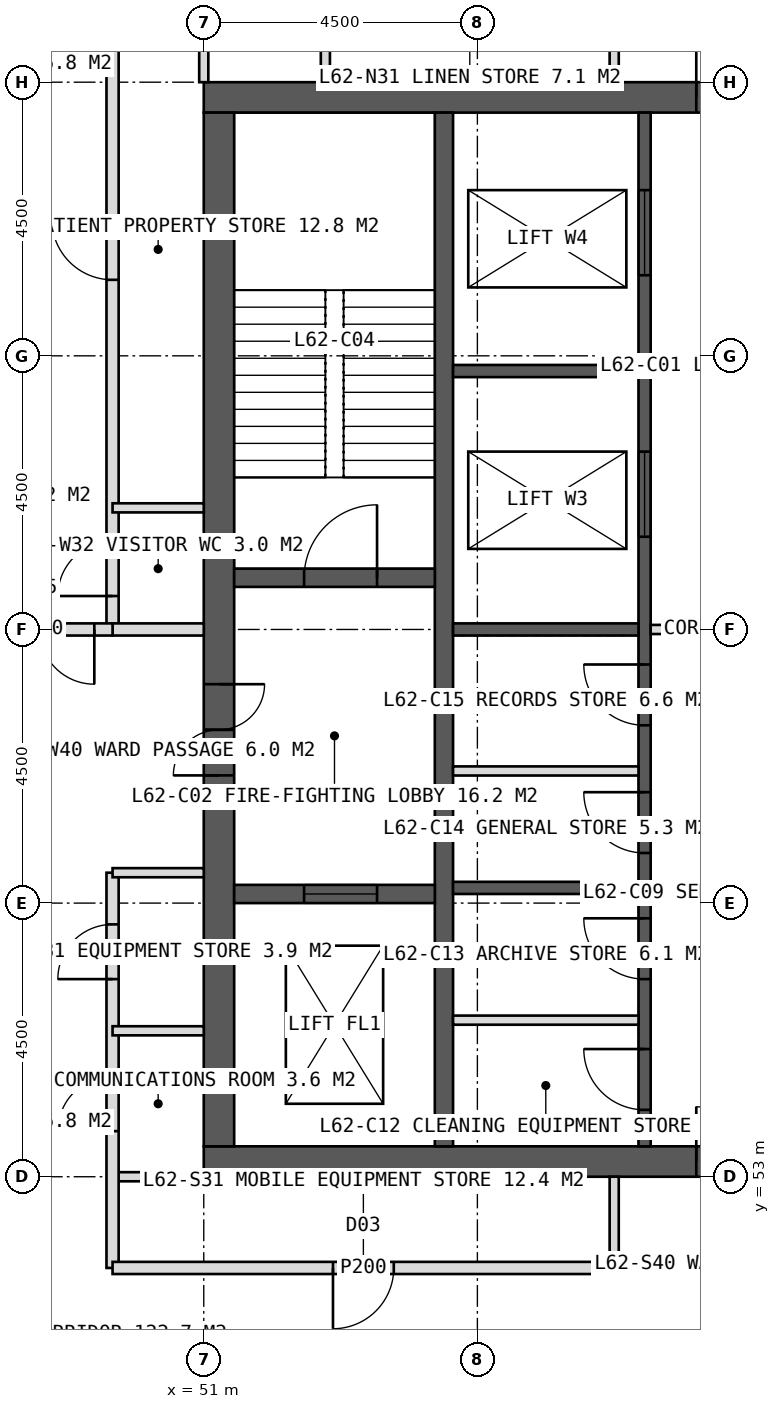
"""IFC4 building model, lengths in metres.
Left out: names, types, materials, properties, quantities, classifications, styles, units other than length and angle.
Written with IfcOpenShell. Run it as: python <this file> out.ifc"""

import sys

from ifc_helpers import new_model, si_unit, direction, frame, frame_2d, origin, place, context, subcontext, project, spatial, rectangle, extrude, element, fill, save


model = new_model("IFC4")
c1 = context("Model", 3, precision=1e-05, world=origin(), true_north=direction((0.0, 1.0)))
c2 = subcontext(c1, "Body", "Model", "MODEL_VIEW")
j1 = project(units=[si_unit("LENGTHUNIT", "METRE"), si_unit("PLANEANGLEUNIT", "RADIAN")], contexts=[c1])
p1 = place(None, origin())
s1 = spatial("IfcSite", under=j1, at=p1, CompositionType="ELEMENT")
p2 = place(p1, origin())
s2 = spatial("IfcBuilding", under=s1, at=p2, CompositionType="ELEMENT")
p3 = place(p2, frame((0.0, 0.0, 258.0)))
s3 = spatial("IfcBuildingStorey", under=s2, at=p3, CompositionType="ELEMENT", Elevation=258.0)
p4 = place(p3, frame((51.0, 70.75, 0.0), z_axis=(0.0, 0.0, 1.0), x_axis=(1.0, 0.0, 0.0)))
e1 = element("IfcWall", 1, at=p4, inside=s3, PredefinedType="SHEAR", context=c2, shape_type="SweptSolid", body=[
    extrude(rectangle(XDim=18.0, YDim=0.5, at=frame_2d((9.0, 0.0))), origin(), (0.0, 0.0, 1.0), 4.0),
])
p5 = place(p4, frame((8.1, 0.0, 0.0)))
e2 = element("IfcOpeningElement", 2, at=p5, cuts=e1, PredefinedType="OPENING", context=c2, shape_type="SweptSolid", body=[
    extrude(rectangle(XDim=1.8, YDim=2.2, at=frame_2d((0.9, 1.1))), frame((0.0, 0.26, 0.0), z_axis=(0.0, -1.0, 0.0), x_axis=(1.0, 0.0, 0.0)), (0.0, 0.0, 1.0), 0.52),
])
p6 = place(p3, frame((51.0, 53.25, 0.0), z_axis=(0.0, 0.0, 1.0), x_axis=(1.0, 0.0, 0.0)))
e3 = element("IfcWall", 3, at=p6, inside=s3, PredefinedType="SHEAR", context=c2, shape_type="SweptSolid", body=[
    extrude(rectangle(XDim=18.0, YDim=0.5, at=frame_2d((9.0, 0.0))), origin(), (0.0, 0.0, 1.0), 4.0),
])
p7 = place(p6, frame((8.1, 0.0, 0.0)))
e4 = element("IfcOpeningElement", 4, at=p7, cuts=e3, PredefinedType="OPENING", context=c2, shape_type="SweptSolid", body=[
    extrude(rectangle(XDim=1.8, YDim=2.2, at=frame_2d((0.9, 1.1))), frame((0.0, 0.26, 0.0), z_axis=(0.0, -1.0, 0.0), x_axis=(1.0, 0.0, 0.0)), (0.0, 0.0, 1.0), 0.52),
])
p8 = place(p3, frame((51.25, 53.5, 0.0), z_axis=(0.0, 0.0, 1.0), x_axis=(0.0, 1.0, 0.0)))
e5 = element("IfcWall", 5, at=p8, inside=s3, PredefinedType="SHEAR", context=c2, shape_type="SweptSolid", body=[
    extrude(rectangle(XDim=17.0, YDim=0.5, at=frame_2d((8.5, 0.0))), origin(), (0.0, 0.0, 1.0), 4.0),
])
p9 = place(p8, frame((6.1, 0.0, 0.0)))
e6 = element("IfcOpeningElement", 6, at=p9, cuts=e5, PredefinedType="OPENING", context=c2, shape_type="SweptSolid", body=[
    extrude(rectangle(XDim=1.5, YDim=2.2, at=frame_2d((0.75, 1.1))), frame((0.0, 0.26, 0.0), z_axis=(0.0, -1.0, 0.0), x_axis=(1.0, 0.0, 0.0)), (0.0, 0.0, 1.0), 0.52),
])
p10 = place(p3, frame((54.95, 53.5, 0.0), z_axis=(0.0, 0.0, 1.0), x_axis=(0.0, 1.0, 0.0)))
e7 = element("IfcWall", 7, at=p10, inside=s3, PredefinedType="SHEAR", context=c2, shape_type="SweptSolid", body=[
    extrude(rectangle(XDim=17.0, YDim=0.3, at=frame_2d((8.5, 0.0))), origin(), (0.0, 0.0, 1.0), 4.0),
])
p11 = place(p3, frame((58.25, 53.5, 0.0), z_axis=(0.0, 0.0, 1.0), x_axis=(0.0, 1.0, 0.0)))
e8 = element("IfcWall", 8, at=p11, inside=s3, PredefinedType="SHEAR", context=c2, shape_type="SweptSolid", body=[
    extrude(rectangle(XDim=17.0, YDim=0.2, at=frame_2d((8.5, 0.0))), origin(), (0.0, 0.0, 1.0), 4.0),
])
p12 = place(p11, frame((0.6, 0.0, 0.0)))
e9 = element("IfcOpeningElement", 9, at=p12, cuts=e8, PredefinedType="OPENING", context=c2, shape_type="SweptSolid", body=[
    extrude(rectangle(XDim=1.0, YDim=2.1, at=frame_2d((0.5, 1.05))), frame((0.0, 0.11, 0.0), z_axis=(0.0, -1.0, 0.0), x_axis=(1.0, 0.0, 0.0)), (0.0, 0.0, 1.0), 0.22),
])
p13 = place(p11, frame((2.75, 0.0, 0.0)))
e10 = element("IfcOpeningElement", 10, at=p13, cuts=e8, PredefinedType="OPENING", context=c2, shape_type="SweptSolid", body=[
    extrude(rectangle(XDim=1.0, YDim=2.1, at=frame_2d((0.5, 1.05))), frame((0.0, 0.11, 0.0), z_axis=(0.0, -1.0, 0.0), x_axis=(1.0, 0.0, 0.0)), (0.0, 0.0, 1.0), 0.22),
])
p14 = place(p11, frame((4.824, 0.0, 0.0)))
e11 = element("IfcOpeningElement", 11, at=p14, cuts=e8, PredefinedType="OPENING", context=c2, shape_type="SweptSolid", body=[
    extrude(rectangle(XDim=1.0, YDim=2.1, at=frame_2d((0.5, 1.05))), frame((0.0, 0.11, 0.0), z_axis=(0.0, -1.0, 0.0), x_axis=(1.0, 0.0, 0.0)), (0.0, 0.0, 1.0), 0.22),
])
p15 = place(p11, frame((6.924, 0.0, 0.0)))
e12 = element("IfcOpeningElement", 12, at=p15, cuts=e8, PredefinedType="OPENING", context=c2, shape_type="SweptSolid", body=[
    extrude(rectangle(XDim=1.0, YDim=2.1, at=frame_2d((0.5, 1.05))), frame((0.0, 0.11, 0.0), z_axis=(0.0, -1.0, 0.0), x_axis=(1.0, 0.0, 0.0)), (0.0, 0.0, 1.0), 0.22),
])
p16 = place(p11, frame((10.025, 0.0, 0.0)))
e13 = element("IfcOpeningElement", 13, at=p16, cuts=e8, PredefinedType="OPENING", context=c2, shape_type="SweptSolid", body=[
    extrude(rectangle(XDim=1.4, YDim=2.2, at=frame_2d((0.7, 1.1))), frame((0.0, 0.11, 0.0), z_axis=(0.0, -1.0, 0.0), x_axis=(1.0, 0.0, 0.0)), (0.0, 0.0, 1.0), 0.22),
])
p17 = place(p11, frame((14.325, 0.0, 0.0)))
e14 = element("IfcOpeningElement", 14, at=p17, cuts=e8, PredefinedType="OPENING", context=c2, shape_type="SweptSolid", body=[
    extrude(rectangle(XDim=1.4, YDim=2.2, at=frame_2d((0.7, 1.1))), frame((0.0, 0.11, 0.0), z_axis=(0.0, -1.0, 0.0), x_axis=(1.0, 0.0, 0.0)), (0.0, 0.0, 1.0), 0.22),
])
for number, where, z_axis, x_axis in (
    (15, (55.1, 57.75, 0.0), (0.0, 0.0, 1.0), (1.0, 0.0, 0.0)),
    (16, (55.1, 62.0, 0.0), (0.0, 0.0, 1.0), (1.0, 0.0, 0.0)),
    (17, (55.1, 66.25, 0.0), (0.0, 0.0, 1.0), (1.0, 0.0, 0.0)),
):
    element("IfcWall", number, at=place(p3, frame(where, z_axis=z_axis, x_axis=x_axis)), inside=s3, PredefinedType="SHEAR", context=c2, shape_type="SweptSolid", body=[
        extrude(rectangle(XDim=3.05, YDim=0.2, at=frame_2d((1.525, 0.0))), origin(), (0.0, 0.0, 1.0), 4.0),
    ])
p18 = place(p3, frame((51.5, 62.85, 0.0), z_axis=(0.0, 0.0, 1.0), x_axis=(1.0, 0.0, 0.0)))
e18 = element("IfcWall", 18, at=p18, inside=s3, PredefinedType="SHEAR", context=c2, shape_type="SweptSolid", body=[
    extrude(rectangle(XDim=3.3, YDim=0.3, at=frame_2d((1.65, 0.0))), origin(), (0.0, 0.0, 1.0), 4.0),
])
p19 = place(p18, frame((1.15, 0.0, 0.0)))
e19 = element("IfcOpeningElement", 19, at=p19, cuts=e18, PredefinedType="OPENING", context=c2, shape_type="SweptSolid", body=[
    extrude(rectangle(XDim=1.2, YDim=2.1, at=frame_2d((0.6, 1.05))), frame((0.0, 0.16, 0.0), z_axis=(0.0, -1.0, 0.0), x_axis=(1.0, 0.0, 0.0)), (0.0, 0.0, 1.0), 0.32),
])
p20 = place(p3, frame((51.5, 57.65, 0.0), z_axis=(0.0, 0.0, 1.0), x_axis=(1.0, 0.0, 0.0)))
e20 = element("IfcWall", 20, at=p20, inside=s3, PredefinedType="SHEAR", context=c2, shape_type="SweptSolid", body=[
    extrude(rectangle(XDim=3.3, YDim=0.3, at=frame_2d((1.65, 0.0))), origin(), (0.0, 0.0, 1.0), 4.0),
])
p21 = place(p20, frame((1.15, 0.0, 0.0)))
e21 = element("IfcOpeningElement", 21, at=p21, cuts=e20, PredefinedType="OPENING", context=c2, shape_type="SweptSolid", body=[
    extrude(rectangle(XDim=1.2, YDim=2.2, at=frame_2d((0.6, 1.1))), frame((0.0, 0.16, 0.0), z_axis=(0.0, -1.0, 0.0), x_axis=(1.0, 0.0, 0.0)), (0.0, 0.0, 1.0), 0.32),
])
for number, where, z_axis, x_axis in (
    (22, (51.0, 71.0, 0.0), (0.0, 0.0, 1.0), (0.0, 1.0, 0.0)),
    (23, (57.75, 71.0, 0.0), (0.0, 0.0, 1.0), (0.0, 1.0, 0.0)),
    (24, (53.0, 71.0, 0.0), (0.0, 0.0, 1.0), (0.0, 1.0, 0.0)),
    (25, (51.0, 53.0, 0.0), (0.0, 0.0, 1.0), (-1.0, 0.0, 0.0)),
):
    element("IfcWall", number, at=place(p3, frame(where, z_axis=z_axis, x_axis=x_axis)), inside=s3, PredefinedType="PARTITIONING", context=c2, shape_type="SweptSolid", body=[
        extrude(rectangle(XDim=1.5, YDim=0.15, at=frame_2d((0.75, 0.0))), origin(), (0.0, 0.0, 1.0), 3.75),
    ])
p22 = place(p3, frame((49.5, 51.5, 0.0), z_axis=(0.0, 0.0, 1.0), x_axis=(0.0, 1.0, 0.0)))
e26 = element("IfcWall", 26, at=p22, inside=s3, PredefinedType="PARTITIONING", context=c2, shape_type="SweptSolid", body=[
    extrude(rectangle(XDim=6.5, YDim=0.2, at=frame_2d((3.25, 0.0))), origin(), (0.0, 0.0, 1.0), 3.75),
])
p23 = place(p22, frame((2.25, 0.0, 0.0)))
e27 = element("IfcOpeningElement", 27, at=p23, cuts=e26, PredefinedType="OPENING", context=c2, shape_type="SweptSolid", body=[
    extrude(rectangle(XDim=0.9, YDim=2.1, at=frame_2d((0.45, 1.05))), frame((0.0, 0.11, 0.0), z_axis=(0.0, -1.0, 0.0), x_axis=(1.0, 0.0, 0.0)), (0.0, 0.0, 1.0), 0.22),
])
p24 = place(p22, frame((4.75, 0.0, 0.0)))
e28 = element("IfcOpeningElement", 28, at=p24, cuts=e26, PredefinedType="OPENING", context=c2, shape_type="SweptSolid", body=[
    extrude(rectangle(XDim=0.9, YDim=2.1, at=frame_2d((0.45, 1.05))), frame((0.0, 0.11, 0.0), z_axis=(0.0, -1.0, 0.0), x_axis=(1.0, 0.0, 0.0)), (0.0, 0.0, 1.0), 0.22),
])
p25 = place(p3, frame((49.5, 62.0, 0.0), z_axis=(0.0, 0.0, 1.0), x_axis=(0.0, 1.0, 0.0)))
e29 = element("IfcWall", 29, at=p25, inside=s3, PredefinedType="PARTITIONING", context=c2, shape_type="SweptSolid", body=[
    extrude(rectangle(XDim=10.5, YDim=0.2, at=frame_2d((5.25, 0.0))), origin(), (0.0, 0.0, 1.0), 3.75),
])
p26 = place(p25, frame((0.55, 0.0, 0.0)))
e30 = element("IfcOpeningElement", 30, at=p26, cuts=e29, PredefinedType="OPENING", context=c2, shape_type="SweptSolid", body=[
    extrude(rectangle(XDim=0.9, YDim=2.1, at=frame_2d((0.45, 1.05))), frame((0.0, 0.11, 0.0), z_axis=(0.0, -1.0, 0.0), x_axis=(1.0, 0.0, 0.0)), (0.0, 0.0, 1.0), 0.22),
])
p27 = place(p25, frame((5.75, 0.0, 0.0)))
e31 = element("IfcOpeningElement", 31, at=p27, cuts=e29, PredefinedType="OPENING", context=c2, shape_type="SweptSolid", body=[
    extrude(rectangle(XDim=1.0, YDim=2.1, at=frame_2d((0.5, 1.05))), frame((0.0, 0.11, 0.0), z_axis=(0.0, -1.0, 0.0), x_axis=(1.0, 0.0, 0.0)), (0.0, 0.0, 1.0), 0.22),
])
p28 = place(p3, frame((51.0, 58.0, 0.0), z_axis=(0.0, 0.0, 1.0), x_axis=(-1.0, 0.0, 0.0)))
e32 = element("IfcWall", 32, at=p28, inside=s3, PredefinedType="PARTITIONING", context=c2, shape_type="SweptSolid", body=[
    extrude(rectangle(XDim=1.5, YDim=0.15, at=frame_2d((0.75, 0.0))), origin(), (0.0, 0.0, 1.0), 3.75),
])
p29 = place(p3, frame((51.0, 62.0, 0.0), z_axis=(0.0, 0.0, 1.0), x_axis=(-1.0, 0.0, 0.0)))
e33 = element("IfcWall", 33, at=p29, inside=s3, PredefinedType="SOLIDWALL", context=c2, shape_type="SweptSolid", body=[
    extrude(rectangle(XDim=1.5, YDim=0.2, at=frame_2d((0.75, 0.0))), origin(), (0.0, 0.0, 1.0), 2.75),
])
for number, where, z_axis, x_axis in (
    (34, (51.0, 55.4, 0.0), (0.0, 0.0, 1.0), (-1.0, 0.0, 0.0)),
    (35, (51.0, 64.0, 0.0), (0.0, 0.0, 1.0), (-1.0, 0.0, 0.0)),
):
    element("IfcWall", number, at=place(p3, frame(where, z_axis=z_axis, x_axis=x_axis)), inside=s3, PredefinedType="PARTITIONING", context=c2, shape_type="SweptSolid", body=[
        extrude(rectangle(XDim=1.5, YDim=0.15, at=frame_2d((0.75, 0.0))), origin(), (0.0, 0.0, 1.0), 3.75),
    ])
p30 = place(p3, frame((57.75, 51.5, 0.0), z_axis=(0.0, 0.0, 1.0), x_axis=(-1.0, 0.0, 0.0)))
e36 = element("IfcWall", 36, at=p30, inside=s3, PredefinedType="PARTITIONING", context=c2, shape_type="SweptSolid", body=[
    extrude(rectangle(XDim=8.25, YDim=0.2, at=frame_2d((4.125, 0.0))), origin(), (0.0, 0.0, 1.0), 3.75),
])
p31 = place(p30, frame((3.625, 0.0, 0.0)))
e37 = element("IfcOpeningElement", 37, at=p31, cuts=e36, PredefinedType="OPENING", context=c2, shape_type="SweptSolid", body=[
    extrude(rectangle(XDim=1.0, YDim=2.1, at=frame_2d((0.5, 1.05))), frame((0.0, 0.11, 0.0), z_axis=(0.0, -1.0, 0.0), x_axis=(1.0, 0.0, 0.0)), (0.0, 0.0, 1.0), 0.22),
])
p32 = place(p3, frame((57.75, 53.0, 0.0), z_axis=(0.0, 0.0, 1.0), x_axis=(0.0, -1.0, 0.0)))
e38 = element("IfcWall", 38, at=p32, inside=s3, PredefinedType="PARTITIONING", context=c2, shape_type="SweptSolid", body=[
    extrude(rectangle(XDim=1.5, YDim=0.15, at=frame_2d((0.75, 0.0))), origin(), (0.0, 0.0, 1.0), 3.75),
])
p33 = place(p3, frame((49.5, 62.0, 0.0), z_axis=(0.0, 0.0, 1.0), x_axis=(-1.0, 0.0, 0.0)))
e39 = element("IfcWall", 39, at=p33, inside=s3, PredefinedType="SOLIDWALL", context=c2, shape_type="SweptSolid", body=[
    extrude(rectangle(XDim=2.6, YDim=0.2, at=frame_2d((1.3, 0.0))), origin(), (0.0, 0.0, 1.0), 2.75),
])
p34 = place(p33, frame((0.3, 0.0, 0.0)))
e40 = element("IfcOpeningElement", 40, at=p34, cuts=e39, PredefinedType="OPENING", context=c2, shape_type="SweptSolid", body=[
    extrude(rectangle(XDim=1.8, YDim=2.2, at=frame_2d((0.9, 1.1))), frame((0.0, 0.11, 0.0), z_axis=(0.0, -1.0, 0.0), x_axis=(1.0, 0.0, 0.0)), (0.0, 0.0, 1.0), 0.22),
])
for number, where, z_axis, x_axis in (
    (41, (55.1, 55.575, 0.0), (0.0, 0.0, 1.0), (1.0, 0.0, 0.0)),
    (42, (55.1, 59.673, 0.0), (0.0, 0.0, 1.0), (1.0, 0.0, 0.0)),
):
    element("IfcWall", number, at=place(p3, frame(where, z_axis=z_axis, x_axis=x_axis)), inside=s3, PredefinedType="PARTITIONING", context=c2, shape_type="SweptSolid", body=[
        extrude(rectangle(XDim=3.05, YDim=0.15, at=frame_2d((1.525, 0.0))), origin(), (0.0, 0.0, 1.0), 3.75),
    ])
p35 = place(p3, frame((58.35, 62.0, 0.0), z_axis=(0.0, 0.0, 1.0), x_axis=(1.0, 0.0, 0.0)))
e43 = element("IfcWall", 43, at=p35, inside=s3, PredefinedType="PARTITIONING", context=c2, shape_type="SweptSolid", body=[
    extrude(rectangle(XDim=3.3, YDim=0.15, at=frame_2d((1.65, 0.0))), origin(), (0.0, 0.0, 1.0), 3.75),
])
p36 = place(p23, origin())
e44 = element("IfcDoor", 44, at=p36, inside=s3, OperationType="SINGLE_SWING_LEFT", PredefinedType="DOOR", context=c2, shape_type="SweptSolid", body=[
    extrude(rectangle(XDim=0.9, YDim=2.1, at=frame_2d((0.45, 1.05))), frame((0.0, 0.025, 0.0), z_axis=(0.0, -1.0, 0.0), x_axis=(1.0, 0.0, 0.0)), (0.0, 0.0, 1.0), 0.05),
])
fill(e27, e44)
p37 = place(p24, origin())
e45 = element("IfcDoor", 45, at=p37, inside=s3, OperationType="SINGLE_SWING_LEFT", PredefinedType="DOOR", context=c2, shape_type="SweptSolid", body=[
    extrude(rectangle(XDim=0.9, YDim=2.1, at=frame_2d((0.45, 1.05))), frame((0.0, 0.025, 0.0), z_axis=(0.0, -1.0, 0.0), x_axis=(1.0, 0.0, 0.0)), (0.0, 0.0, 1.0), 0.05),
])
fill(e28, e45)
p38 = place(p26, origin())
e46 = element("IfcDoor", 46, at=p38, inside=s3, OperationType="SINGLE_SWING_LEFT", PredefinedType="DOOR", context=c2, shape_type="SweptSolid", body=[
    extrude(rectangle(XDim=0.9, YDim=2.1, at=frame_2d((0.45, 1.05))), frame((0.0, 0.025, 0.0), z_axis=(0.0, -1.0, 0.0), x_axis=(1.0, 0.0, 0.0)), (0.0, 0.0, 1.0), 0.05),
])
fill(e30, e46)
p39 = place(p27, origin())
e47 = element("IfcDoor", 47, at=p39, inside=s3, OperationType="SINGLE_SWING_RIGHT", PredefinedType="DOOR", context=c2, shape_type="SweptSolid", body=[
    extrude(rectangle(XDim=1.0, YDim=2.1, at=frame_2d((0.5, 1.05))), frame((0.0, 0.025, 0.0), z_axis=(0.0, -1.0, 0.0), x_axis=(1.0, 0.0, 0.0)), (0.0, 0.0, 1.0), 0.05),
])
fill(e31, e47)
p40 = place(p31, origin())
e48 = element("IfcDoor", 48, at=p40, inside=s3, OperationType="SINGLE_SWING_RIGHT", PredefinedType="DOOR", context=c2, shape_type="SweptSolid", body=[
    extrude(rectangle(XDim=1.0, YDim=2.1, at=frame_2d((0.5, 1.05))), frame((0.0, 0.025, 0.0), z_axis=(0.0, -1.0, 0.0), x_axis=(1.0, 0.0, 0.0)), (0.0, 0.0, 1.0), 0.05),
])
fill(e37, e48)
p41 = place(p34, origin())
e49 = element("IfcDoor", 49, at=p41, inside=s3, OperationType="DOUBLE_DOOR_DOUBLE_SWING", PredefinedType="DOOR", context=c2, shape_type="SweptSolid", body=[
    extrude(rectangle(XDim=1.8, YDim=2.2, at=frame_2d((0.9, 1.1))), frame((0.0, 0.025, 0.0), z_axis=(0.0, -1.0, 0.0), x_axis=(1.0, 0.0, 0.0)), (0.0, 0.0, 1.0), 0.05),
])
fill(e40, e49)
p42 = place(p5, origin())
e50 = element("IfcDoor", 50, at=p42, inside=s3, OperationType="DOUBLE_DOOR_SINGLE_SWING", PredefinedType="DOOR", context=c2, shape_type="SweptSolid", body=[
    extrude(rectangle(XDim=1.8, YDim=2.2, at=frame_2d((0.9, 1.1))), frame((0.0, 0.025, 0.0), z_axis=(0.0, -1.0, 0.0), x_axis=(1.0, 0.0, 0.0)), (0.0, 0.0, 1.0), 0.05),
])
fill(e2, e50)
p43 = place(p9, origin())
e51 = element("IfcDoor", 51, at=p43, inside=s3, OperationType="DOUBLE_DOOR_SINGLE_SWING", PredefinedType="DOOR", context=c2, shape_type="SweptSolid", body=[
    extrude(rectangle(XDim=1.5, YDim=2.2, at=frame_2d((0.75, 1.1))), frame((0.0, 0.025, 0.0), z_axis=(0.0, -1.0, 0.0), x_axis=(1.0, 0.0, 0.0)), (0.0, 0.0, 1.0), 0.05),
])
fill(e6, e51)
p44 = place(p19, origin())
e52 = element("IfcDoor", 52, at=p44, inside=s3, OperationType="SINGLE_SWING_RIGHT", PredefinedType="DOOR", context=c2, shape_type="SweptSolid", body=[
    extrude(rectangle(XDim=1.2, YDim=2.1, at=frame_2d((0.6, 1.05))), frame((0.0, 0.025, 0.0), z_axis=(0.0, -1.0, 0.0), x_axis=(1.0, 0.0, 0.0)), (0.0, 0.0, 1.0), 0.05),
])
fill(e19, e52)
p45 = place(p21, origin())
e53 = element("IfcDoor", 53, at=p45, inside=s3, OperationType="SLIDING_TO_LEFT", PredefinedType="DOOR", context=c2, shape_type="SweptSolid", body=[
    extrude(rectangle(XDim=1.2, YDim=2.2, at=frame_2d((0.6, 1.1))), frame((0.0, 0.025, 0.0), z_axis=(0.0, -1.0, 0.0), x_axis=(1.0, 0.0, 0.0)), (0.0, 0.0, 1.0), 0.05),
])
fill(e21, e53)
p46 = place(p12, origin())
e54 = element("IfcDoor", 54, at=p46, inside=s3, OperationType="SINGLE_SWING_RIGHT", PredefinedType="DOOR", context=c2, shape_type="SweptSolid", body=[
    extrude(rectangle(XDim=1.0, YDim=2.1, at=frame_2d((0.5, 1.05))), frame((0.0, 0.025, 0.0), z_axis=(0.0, -1.0, 0.0), x_axis=(1.0, 0.0, 0.0)), (0.0, 0.0, 1.0), 0.05),
])
fill(e9, e54)
p47 = place(p13, origin())
e55 = element("IfcDoor", 55, at=p47, inside=s3, OperationType="SINGLE_SWING_RIGHT", PredefinedType="DOOR", context=c2, shape_type="SweptSolid", body=[
    extrude(rectangle(XDim=1.0, YDim=2.1, at=frame_2d((0.5, 1.05))), frame((0.0, 0.025, 0.0), z_axis=(0.0, -1.0, 0.0), x_axis=(1.0, 0.0, 0.0)), (0.0, 0.0, 1.0), 0.05),
])
fill(e10, e55)
p48 = place(p14, origin())
e56 = element("IfcDoor", 56, at=p48, inside=s3, OperationType="SINGLE_SWING_RIGHT", PredefinedType="DOOR", context=c2, shape_type="SweptSolid", body=[
    extrude(rectangle(XDim=1.0, YDim=2.1, at=frame_2d((0.5, 1.05))), frame((0.0, 0.025, 0.0), z_axis=(0.0, -1.0, 0.0), x_axis=(1.0, 0.0, 0.0)), (0.0, 0.0, 1.0), 0.05),
])
fill(e11, e56)
p49 = place(p15, origin())
e57 = element("IfcDoor", 57, at=p49, inside=s3, OperationType="SINGLE_SWING_RIGHT", PredefinedType="DOOR", context=c2, shape_type="SweptSolid", body=[
    extrude(rectangle(XDim=1.0, YDim=2.1, at=frame_2d((0.5, 1.05))), frame((0.0, 0.025, 0.0), z_axis=(0.0, -1.0, 0.0), x_axis=(1.0, 0.0, 0.0)), (0.0, 0.0, 1.0), 0.05),
])
fill(e12, e57)
p50 = place(p16, origin())
e58 = element("IfcDoor", 58, at=p50, inside=s3, OperationType="SLIDING_TO_LEFT", PredefinedType="DOOR", context=c2, shape_type="SweptSolid", body=[
    extrude(rectangle(XDim=1.4, YDim=2.2, at=frame_2d((0.7, 1.1))), frame((0.0, 0.025, 0.0), z_axis=(0.0, -1.0, 0.0), x_axis=(1.0, 0.0, 0.0)), (0.0, 0.0, 1.0), 0.05),
])
fill(e13, e58)
p51 = place(p17, origin())
e59 = element("IfcDoor", 59, at=p51, inside=s3, OperationType="SLIDING_TO_LEFT", PredefinedType="DOOR", context=c2, shape_type="SweptSolid", body=[
    extrude(rectangle(XDim=1.4, YDim=2.2, at=frame_2d((0.7, 1.1))), frame((0.0, 0.025, 0.0), z_axis=(0.0, -1.0, 0.0), x_axis=(1.0, 0.0, 0.0)), (0.0, 0.0, 1.0), 0.05),
])
fill(e14, e59)
p52 = place(p7, origin())
e60 = element("IfcDoor", 60, at=p52, inside=s3, OperationType="DOUBLE_DOOR_SINGLE_SWING", PredefinedType="DOOR", context=c2, shape_type="SweptSolid", body=[
    extrude(rectangle(XDim=1.8, YDim=2.2, at=frame_2d((0.9, 1.1))), frame((0.0, 0.025, 0.0), z_axis=(0.0, -1.0, 0.0), x_axis=(1.0, 0.0, 0.0)), (0.0, 0.0, 1.0), 0.05),
])
fill(e4, e60)
save(model, sys.argv[1])
